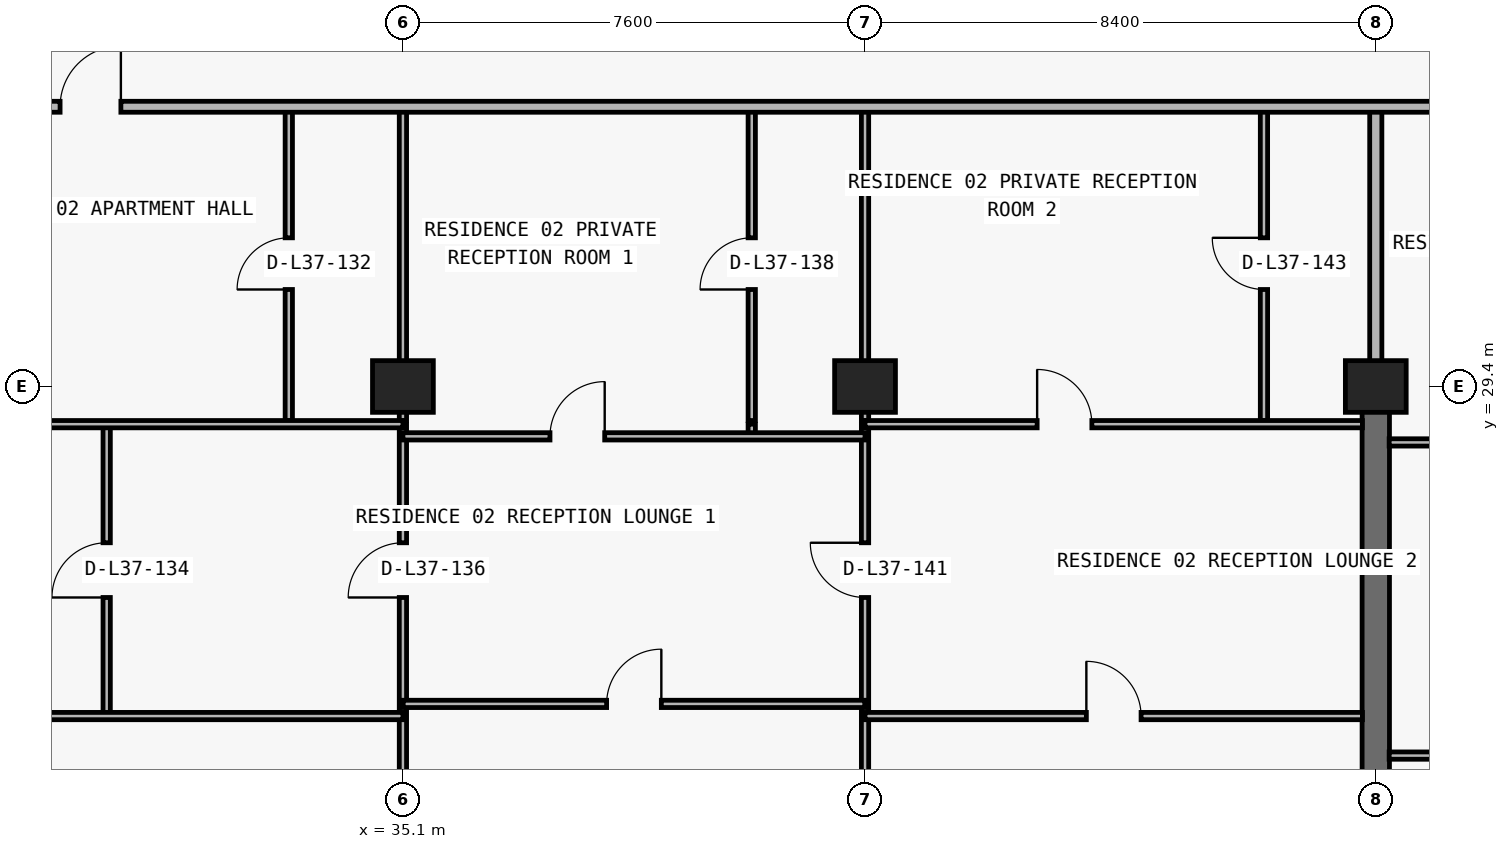
"""IFC4 building model, lengths in metres.
Left out: names, types, materials, properties, quantities, classifications, styles, units other than length and angle.
Written with IfcOpenShell. Run it as: python <this file> out.ifc"""

import sys

from ifc_helpers import new_model, si_unit, direction, frame, frame_2d, origin, origin_2d, place, context, subcontext, project, spatial, rectangle, extrude, element, fill, save


model = new_model("IFC4")
c1 = context("Model", 3, precision=1e-05, world=origin(), true_north=direction((0.0, 1.0)))
c2 = subcontext(c1, "Body", "Model", "MODEL_VIEW")
j1 = project(units=[si_unit("LENGTHUNIT", "METRE"), si_unit("PLANEANGLEUNIT", "RADIAN")], contexts=[c1])
p1 = place(None, origin())
s1 = spatial("IfcSite", under=j1, at=p1, CompositionType="ELEMENT")
p2 = place(p1, origin())
s2 = spatial("IfcBuilding", under=s1, at=p2, CompositionType="ELEMENT")
p3 = place(p2, frame((0.0, 0.0, 135.6)))
s3 = spatial("IfcBuildingStorey", under=s2, at=p3, CompositionType="ELEMENT", Elevation=135.6)
for number, where, z_axis, x_axis in (
    (1, (35.1, 29.4, 0.0), (0.0, 0.0, 1.0), (1.0, 0.0, 0.0)),
    (2, (42.7, 29.4, 0.0), (0.0, 0.0, 1.0), (1.0, 0.0, 0.0)),
    (3, (51.1, 29.4, 0.0), (0.0, 0.0, 1.0), (1.0, 0.0, 0.0)),
):
    element("IfcColumn", number, at=place(p3, frame(where, z_axis=z_axis, x_axis=x_axis)), inside=s3, PredefinedType="COLUMN", context=c2, shape_type="SweptSolid", body=[
        extrude(rectangle(XDim=1.0, YDim=0.85, at=origin_2d()), origin(), (0.0, 0.0, 1.0), 3.05),
    ])
p4 = place(p3, frame((51.1, 20.8, 0.0), z_axis=(0.0, 0.0, 1.0), x_axis=(0.0, 1.0, 0.0)))
e4 = element("IfcWall", 4, at=p4, inside=s3, PredefinedType="SHEAR", context=c2, shape_type="SweptSolid", body=[
    extrude(rectangle(XDim=8.6, YDim=0.45, at=frame_2d((4.3, 0.0))), origin(), (0.0, 0.0, 1.0), 3.05),
])
p5 = place(p3, frame((30.228, 23.98, 0.0), z_axis=(0.0, 0.0, 1.0), x_axis=(0.0, 1.0, 0.0)))
e5 = element("IfcWall", 5, at=p5, inside=s3, PredefinedType="PARTITIONING", context=c2, shape_type="SweptSolid", body=[
    extrude(rectangle(XDim=4.8, YDim=0.12, at=frame_2d((2.4, 0.0))), origin(), (0.0, 0.0, 1.0), 3.05),
])
p6 = place(p5, frame((1.95, 0.0, 0.0)))
e6 = element("IfcOpeningElement", 6, at=p6, cuts=e5, PredefinedType="OPENING", context=c2, shape_type="SweptSolid", body=[
    extrude(rectangle(XDim=0.9, YDim=2.15, at=frame_2d((0.45, 1.075))), frame((0.0, 0.07, 0.0), z_axis=(0.0, -1.0, 0.0), x_axis=(1.0, 0.0, 0.0)), (0.0, 0.0, 1.0), 0.14),
])
p7 = place(p3, frame((33.223, 28.84, 0.0), z_axis=(0.0, 0.0, 1.0), x_axis=(0.0, 1.0, 0.0)))
e7 = element("IfcWall", 7, at=p7, inside=s3, PredefinedType="PARTITIONING", context=c2, shape_type="SweptSolid", body=[
    extrude(rectangle(XDim=5.16, YDim=0.12, at=frame_2d((2.58, 0.0))), origin(), (0.0, 0.0, 1.0), 2.679),
])
p8 = place(p7, frame((2.155, 0.0, 0.0)))
e8 = element("IfcOpeningElement", 8, at=p8, cuts=e7, PredefinedType="OPENING", context=c2, shape_type="SweptSolid", body=[
    extrude(rectangle(XDim=0.85, YDim=2.1, at=frame_2d((0.425, 1.05))), frame((0.0, 0.07, 0.0), z_axis=(0.0, -1.0, 0.0), x_axis=(1.0, 0.0, 0.0)), (0.0, 0.0, 1.0), 0.14),
])
p9 = place(p3, frame((35.1, 8.84, 0.0), z_axis=(0.0, 0.0, 1.0), x_axis=(0.0, 1.0, 0.0)))
e9 = element("IfcWall", 9, at=p9, inside=s3, PredefinedType="PARTITIONING", context=c2, shape_type="SweptSolid", body=[
    extrude(rectangle(XDim=19.94, YDim=0.12, at=frame_2d((9.97, 0.0))), origin(), (0.0, 0.0, 1.0), 2.174),
])
p10 = place(p9, frame((17.09, 0.0, 0.0)))
e10 = element("IfcOpeningElement", 10, at=p10, cuts=e9, PredefinedType="OPENING", context=c2, shape_type="SweptSolid", body=[
    extrude(rectangle(XDim=0.9, YDim=2.124, at=frame_2d((0.45, 1.062))), frame((0.0, 0.07, 0.0), z_axis=(0.0, -1.0, 0.0), x_axis=(1.0, 0.0, 0.0)), (0.0, 0.0, 1.0), 0.14),
])
p11 = place(p3, frame((35.1, 28.84, 0.0), z_axis=(0.0, 0.0, 1.0), x_axis=(0.0, 1.0, 0.0)))
e11 = element("IfcWall", 11, at=p11, inside=s3, PredefinedType="PARTITIONING", context=c2, shape_type="SweptSolid", body=[
    extrude(rectangle(XDim=5.16, YDim=0.12, at=frame_2d((2.58, 0.0))), origin(), (0.0, 0.0, 1.0), 2.174),
])
p12 = place(p3, frame((40.837, 28.58, 0.0), z_axis=(0.0, 0.0, 1.0), x_axis=(0.0, 1.0, 0.0)))
e12 = element("IfcWall", 12, at=p12, inside=s3, PredefinedType="PARTITIONING", context=c2, shape_type="SweptSolid", body=[
    extrude(rectangle(XDim=0.2, YDim=0.12, at=frame_2d((0.1, 0.0))), origin(), (0.0, 0.0, 1.0), 2.679),
])
p13 = place(p3, frame((40.837, 28.84, 0.0), z_axis=(0.0, 0.0, 1.0), x_axis=(0.0, 1.0, 0.0)))
e13 = element("IfcWall", 13, at=p13, inside=s3, PredefinedType="PARTITIONING", context=c2, shape_type="SweptSolid", body=[
    extrude(rectangle(XDim=5.16, YDim=0.12, at=frame_2d((2.58, 0.0))), origin(), (0.0, 0.0, 1.0), 2.679),
])
p14 = place(p13, frame((2.155, 0.0, 0.0)))
e14 = element("IfcOpeningElement", 14, at=p14, cuts=e13, PredefinedType="OPENING", context=c2, shape_type="SweptSolid", body=[
    extrude(rectangle(XDim=0.85, YDim=2.1, at=frame_2d((0.425, 1.05))), frame((0.0, 0.07, 0.0), z_axis=(0.0, -1.0, 0.0), x_axis=(1.0, 0.0, 0.0)), (0.0, 0.0, 1.0), 0.14),
])
p15 = place(p3, frame((42.7, 8.84, 0.0), z_axis=(0.0, 0.0, 1.0), x_axis=(0.0, 1.0, 0.0)))
e15 = element("IfcWall", 15, at=p15, inside=s3, PredefinedType="PARTITIONING", context=c2, shape_type="SweptSolid", body=[
    extrude(rectangle(XDim=19.94, YDim=0.12, at=frame_2d((9.97, 0.0))), origin(), (0.0, 0.0, 1.0), 2.174),
])
p16 = place(p15, frame((17.09, 0.0, 0.0)))
e16 = element("IfcOpeningElement", 16, at=p16, cuts=e15, PredefinedType="OPENING", context=c2, shape_type="SweptSolid", body=[
    extrude(rectangle(XDim=0.9, YDim=2.124, at=frame_2d((0.45, 1.062))), frame((0.0, 0.07, 0.0), z_axis=(0.0, -1.0, 0.0), x_axis=(1.0, 0.0, 0.0)), (0.0, 0.0, 1.0), 0.14),
])
p17 = place(p3, frame((42.7, 28.84, 0.0), z_axis=(0.0, 0.0, 1.0), x_axis=(0.0, 1.0, 0.0)))
e17 = element("IfcWall", 17, at=p17, inside=s3, PredefinedType="PARTITIONING", context=c2, shape_type="SweptSolid", body=[
    extrude(rectangle(XDim=5.16, YDim=0.12, at=frame_2d((2.58, 0.0))), origin(), (0.0, 0.0, 1.0), 2.174),
])
p18 = place(p3, frame((49.261, 28.84, 0.0), z_axis=(0.0, 0.0, 1.0), x_axis=(0.0, 1.0, 0.0)))
e18 = element("IfcWall", 18, at=p18, inside=s3, PredefinedType="PARTITIONING", context=c2, shape_type="SweptSolid", body=[
    extrude(rectangle(XDim=5.16, YDim=0.12, at=frame_2d((2.58, 0.0))), origin(), (0.0, 0.0, 1.0), 2.679),
])
p19 = place(p18, frame((2.155, 0.0, 0.0)))
e19 = element("IfcOpeningElement", 19, at=p19, cuts=e18, PredefinedType="OPENING", context=c2, shape_type="SweptSolid", body=[
    extrude(rectangle(XDim=0.85, YDim=2.1, at=frame_2d((0.425, 1.05))), frame((0.0, 0.07, 0.0), z_axis=(0.0, -1.0, 0.0), x_axis=(1.0, 0.0, 0.0)), (0.0, 0.0, 1.0), 0.14),
])
p20 = place(p3, frame((51.1, 29.405, 0.0), z_axis=(0.0, 0.0, 1.0), x_axis=(0.0, 1.0, 0.0)))
e20 = element("IfcWall", 20, at=p20, inside=s3, PredefinedType="PARTITIONING", context=c2, shape_type="SweptSolid", body=[
    extrude(rectangle(XDim=4.595, YDim=0.2, at=frame_2d((2.297, 0.0))), origin(), (0.0, 0.0, 1.0), 2.335),
])
p21 = place(p3, frame((51.32, 23.33, 0.0), z_axis=(0.0, 0.0, 1.0), x_axis=(1.0, 0.0, 0.0)))
e21 = element("IfcWall", 21, at=p21, inside=s3, PredefinedType="PARTITIONING", context=c2, shape_type="SweptSolid", body=[
    extrude(rectangle(XDim=4.566, YDim=0.12, at=frame_2d((2.283, 0.0))), origin(), (0.0, 0.0, 1.0), 3.05),
])
p22 = place(p21, frame((1.414, 0.0, 0.0)))
e22 = element("IfcOpeningElement", 22, at=p22, cuts=e21, PredefinedType="OPENING", context=c2, shape_type="SweptSolid", body=[
    extrude(rectangle(XDim=0.9, YDim=2.15, at=frame_2d((0.45, 1.075))), frame((0.0, 0.07, 0.0), z_axis=(0.0, -1.0, 0.0), x_axis=(1.0, 0.0, 0.0)), (0.0, 0.0, 1.0), 0.14),
])
p23 = place(p3, frame((26.92, 23.98, 0.0), z_axis=(0.0, 0.0, 1.0), x_axis=(1.0, 0.0, 0.0)))
e23 = element("IfcWall", 23, at=p23, inside=s3, PredefinedType="PARTITIONING", context=c2, shape_type="SweptSolid", body=[
    extrude(rectangle(XDim=8.18, YDim=0.12, at=frame_2d((4.09, 0.0))), origin(), (0.0, 0.0, 1.0), 3.05),
])
p24 = place(p23, frame((1.204, 0.0, 0.0)))
e24 = element("IfcOpeningElement", 24, at=p24, cuts=e23, PredefinedType="OPENING", context=c2, shape_type="SweptSolid", body=[
    extrude(rectangle(XDim=0.9, YDim=2.15, at=frame_2d((0.45, 1.075))), frame((0.0, 0.07, 0.0), z_axis=(0.0, -1.0, 0.0), x_axis=(1.0, 0.0, 0.0)), (0.0, 0.0, 1.0), 0.14),
])
p25 = place(p3, frame((42.7, 23.98, 0.0), z_axis=(0.0, 0.0, 1.0), x_axis=(1.0, 0.0, 0.0)))
e25 = element("IfcWall", 25, at=p25, inside=s3, PredefinedType="PARTITIONING", context=c2, shape_type="SweptSolid", body=[
    extrude(rectangle(XDim=8.18, YDim=0.12, at=frame_2d((4.09, 0.0))), origin(), (0.0, 0.0, 1.0), 3.05),
])
p26 = place(p25, frame((3.64, 0.0, 0.0)))
e26 = element("IfcOpeningElement", 26, at=p26, cuts=e25, PredefinedType="OPENING", context=c2, shape_type="SweptSolid", body=[
    extrude(rectangle(XDim=0.9, YDim=2.15, at=frame_2d((0.45, 1.075))), frame((0.0, 0.07, 0.0), z_axis=(0.0, -1.0, 0.0), x_axis=(1.0, 0.0, 0.0)), (0.0, 0.0, 1.0), 0.14),
])
p27 = place(p3, frame((35.105, 24.18, 0.0), z_axis=(0.0, 0.0, 1.0), x_axis=(1.0, 0.0, 0.0)))
e27 = element("IfcWall", 27, at=p27, inside=s3, PredefinedType="PARTITIONING", context=c2, shape_type="SweptSolid", body=[
    extrude(rectangle(XDim=7.59, YDim=0.12, at=frame_2d((3.795, 0.0))), origin(), (0.0, 0.0, 1.0), 3.05),
])
p28 = place(p27, frame((3.345, 0.0, 0.0)))
e28 = element("IfcOpeningElement", 28, at=p28, cuts=e27, PredefinedType="OPENING", context=c2, shape_type="SweptSolid", body=[
    extrude(rectangle(XDim=0.9, YDim=2.15, at=frame_2d((0.45, 1.075))), frame((0.0, 0.07, 0.0), z_axis=(0.0, -1.0, 0.0), x_axis=(1.0, 0.0, 0.0)), (0.0, 0.0, 1.0), 0.14),
])
p29 = place(p3, frame((51.32, 28.48, 0.0), z_axis=(0.0, 0.0, 1.0), x_axis=(1.0, 0.0, 0.0)))
e29 = element("IfcWall", 29, at=p29, inside=s3, PredefinedType="PARTITIONING", context=c2, shape_type="SweptSolid", body=[
    extrude(rectangle(XDim=4.566, YDim=0.12, at=frame_2d((2.283, 0.0))), origin(), (0.0, 0.0, 1.0), 3.05),
])
p30 = place(p29, frame((1.833, 0.0, 0.0)))
e30 = element("IfcOpeningElement", 30, at=p30, cuts=e29, PredefinedType="OPENING", context=c2, shape_type="SweptSolid", body=[
    extrude(rectangle(XDim=0.9, YDim=2.15, at=frame_2d((0.45, 1.075))), frame((0.0, 0.07, 0.0), z_axis=(0.0, -1.0, 0.0), x_axis=(1.0, 0.0, 0.0)), (0.0, 0.0, 1.0), 0.14),
])
p31 = place(p3, frame((35.1, 28.58, 0.0), z_axis=(0.0, 0.0, 1.0), x_axis=(1.0, 0.0, 0.0)))
e31 = element("IfcWall", 31, at=p31, inside=s3, PredefinedType="PARTITIONING", context=c2, shape_type="SweptSolid", body=[
    extrude(rectangle(XDim=7.6, YDim=0.12, at=frame_2d((3.8, 0.0))), origin(), (0.0, 0.0, 1.0), 3.05),
])
p32 = place(p31, frame((2.418, 0.0, 0.0)))
e32 = element("IfcOpeningElement", 32, at=p32, cuts=e31, PredefinedType="OPENING", context=c2, shape_type="SweptSolid", body=[
    extrude(rectangle(XDim=0.9, YDim=2.15, at=frame_2d((0.45, 1.075))), frame((0.0, 0.07, 0.0), z_axis=(0.0, -1.0, 0.0), x_axis=(1.0, 0.0, 0.0)), (0.0, 0.0, 1.0), 0.14),
])
p33 = place(p3, frame((26.92, 28.78, 0.0), z_axis=(0.0, 0.0, 1.0), x_axis=(1.0, 0.0, 0.0)))
e33 = element("IfcWall", 33, at=p33, inside=s3, PredefinedType="PARTITIONING", context=c2, shape_type="SweptSolid", body=[
    extrude(rectangle(XDim=8.18, YDim=0.12, at=frame_2d((4.09, 0.0))), origin(), (0.0, 0.0, 1.0), 3.05),
])
p34 = place(p33, frame((1.204, 0.0, 0.0)))
e34 = element("IfcOpeningElement", 34, at=p34, cuts=e33, PredefinedType="OPENING", context=c2, shape_type="SweptSolid", body=[
    extrude(rectangle(XDim=0.9, YDim=2.15, at=frame_2d((0.45, 1.075))), frame((0.0, 0.07, 0.0), z_axis=(0.0, -1.0, 0.0), x_axis=(1.0, 0.0, 0.0)), (0.0, 0.0, 1.0), 0.14),
])
p35 = place(p3, frame((42.7, 28.78, 0.0), z_axis=(0.0, 0.0, 1.0), x_axis=(1.0, 0.0, 0.0)))
e35 = element("IfcWall", 35, at=p35, inside=s3, PredefinedType="PARTITIONING", context=c2, shape_type="SweptSolid", body=[
    extrude(rectangle(XDim=8.18, YDim=0.12, at=frame_2d((4.09, 0.0))), origin(), (0.0, 0.0, 1.0), 3.05),
])
p36 = place(p35, frame((2.831, 0.0, 0.0)))
e36 = element("IfcOpeningElement", 36, at=p36, cuts=e35, PredefinedType="OPENING", context=c2, shape_type="SweptSolid", body=[
    extrude(rectangle(XDim=0.9, YDim=2.15, at=frame_2d((0.45, 1.075))), frame((0.0, 0.07, 0.0), z_axis=(0.0, -1.0, 0.0), x_axis=(1.0, 0.0, 0.0)), (0.0, 0.0, 1.0), 0.14),
])
p37 = place(p3, frame((18.3, 34.0, 0.0), z_axis=(0.0, 0.0, 1.0), x_axis=(1.0, 0.0, 0.0)))
e37 = element("IfcWall", 37, at=p37, inside=s3, PredefinedType="PARTITIONING", context=c2, shape_type="SweptSolid", body=[
    extrude(rectangle(XDim=37.586, YDim=0.18, at=frame_2d((18.793, 0.0))), origin(), (0.0, 0.0, 1.0), 3.05),
])
p38 = place(p37, frame((11.162, 0.0, 0.0)))
e38 = element("IfcOpeningElement", 38, at=p38, cuts=e37, PredefinedType="OPENING", context=c2, shape_type="SweptSolid", body=[
    extrude(rectangle(XDim=1.0, YDim=2.2, at=frame_2d((0.5, 1.1))), frame((0.0, 0.1, 0.0), z_axis=(0.0, -1.0, 0.0), x_axis=(1.0, 0.0, 0.0)), (0.0, 0.0, 1.0), 0.2),
])
p39 = place(p37, frame((34.693, 0.0, 0.0)))
e39 = element("IfcOpeningElement", 39, at=p39, cuts=e37, PredefinedType="OPENING", context=c2, shape_type="SweptSolid", body=[
    extrude(rectangle(XDim=1.0, YDim=2.2, at=frame_2d((0.5, 1.1))), frame((0.0, 0.1, 0.0), z_axis=(0.0, -1.0, 0.0), x_axis=(1.0, 0.0, 0.0)), (0.0, 0.0, 1.0), 0.2),
])
p40 = place(p38, origin())
e40 = element("IfcDoor", 40, at=p40, inside=s3, OperationType="SINGLE_SWING_RIGHT", PredefinedType="DOOR", context=c2, shape_type="SweptSolid", body=[
    extrude(rectangle(XDim=1.0, YDim=2.2, at=frame_2d((0.5, 1.1))), frame((0.0, 0.025, 0.0), z_axis=(0.0, -1.0, 0.0), x_axis=(1.0, 0.0, 0.0)), (0.0, 0.0, 1.0), 0.05),
])
fill(e38, e40)
p41 = place(p8, origin())
e41 = element("IfcDoor", 41, at=p41, inside=s3, OperationType="SINGLE_SWING_LEFT", PredefinedType="DOOR", context=c2, shape_type="SweptSolid", body=[
    extrude(rectangle(XDim=0.85, YDim=2.1, at=frame_2d((0.425, 1.05))), frame((0.0, 0.025, 0.0), z_axis=(0.0, -1.0, 0.0), x_axis=(1.0, 0.0, 0.0)), (0.0, 0.0, 1.0), 0.05),
])
fill(e8, e41)
p42 = place(p6, origin())
e42 = element("IfcDoor", 42, at=p42, inside=s3, OperationType="SINGLE_SWING_LEFT", PredefinedType="DOOR", context=c2, shape_type="SweptSolid", body=[
    extrude(rectangle(XDim=0.9, YDim=2.15, at=frame_2d((0.45, 1.075))), frame((0.0, 0.025, 0.0), z_axis=(0.0, -1.0, 0.0), x_axis=(1.0, 0.0, 0.0)), (0.0, 0.0, 1.0), 0.05),
])
fill(e6, e42)
p43 = place(p10, origin())
e43 = element("IfcDoor", 43, at=p43, inside=s3, OperationType="SINGLE_SWING_LEFT", PredefinedType="DOOR", context=c2, shape_type="SweptSolid", body=[
    extrude(rectangle(XDim=0.9, YDim=2.124, at=frame_2d((0.45, 1.062))), frame((0.0, 0.025, 0.0), z_axis=(0.0, -1.0, 0.0), x_axis=(1.0, 0.0, 0.0)), (0.0, 0.0, 1.0), 0.05),
])
fill(e10, e43)
p44 = place(p32, origin())
e44 = element("IfcDoor", 44, at=p44, inside=s3, OperationType="SINGLE_SWING_RIGHT", PredefinedType="DOOR", context=c2, shape_type="SweptSolid", body=[
    extrude(rectangle(XDim=0.9, YDim=2.15, at=frame_2d((0.45, 1.075))), frame((0.0, 0.025, 0.0), z_axis=(0.0, -1.0, 0.0), x_axis=(1.0, 0.0, 0.0)), (0.0, 0.0, 1.0), 0.05),
])
fill(e32, e44)
p45 = place(p14, origin())
e45 = element("IfcDoor", 45, at=p45, inside=s3, OperationType="SINGLE_SWING_LEFT", PredefinedType="DOOR", context=c2, shape_type="SweptSolid", body=[
    extrude(rectangle(XDim=0.85, YDim=2.1, at=frame_2d((0.425, 1.05))), frame((0.0, 0.025, 0.0), z_axis=(0.0, -1.0, 0.0), x_axis=(1.0, 0.0, 0.0)), (0.0, 0.0, 1.0), 0.05),
])
fill(e14, e45)
p46 = place(p28, origin())
e46 = element("IfcDoor", 46, at=p46, inside=s3, OperationType="SINGLE_SWING_RIGHT", PredefinedType="DOOR", context=c2, shape_type="SweptSolid", body=[
    extrude(rectangle(XDim=0.9, YDim=2.15, at=frame_2d((0.45, 1.075))), frame((0.0, 0.025, 0.0), z_axis=(0.0, -1.0, 0.0), x_axis=(1.0, 0.0, 0.0)), (0.0, 0.0, 1.0), 0.05),
])
fill(e28, e46)
p47 = place(p16, origin())
e47 = element("IfcDoor", 47, at=p47, inside=s3, OperationType="SINGLE_SWING_RIGHT", PredefinedType="DOOR", context=c2, shape_type="SweptSolid", body=[
    extrude(rectangle(XDim=0.9, YDim=2.124, at=frame_2d((0.45, 1.062))), frame((0.0, 0.025, 0.0), z_axis=(0.0, -1.0, 0.0), x_axis=(1.0, 0.0, 0.0)), (0.0, 0.0, 1.0), 0.05),
])
fill(e16, e47)
p48 = place(p36, origin())
e48 = element("IfcDoor", 48, at=p48, inside=s3, OperationType="SINGLE_SWING_LEFT", PredefinedType="DOOR", context=c2, shape_type="SweptSolid", body=[
    extrude(rectangle(XDim=0.9, YDim=2.15, at=frame_2d((0.45, 1.075))), frame((0.0, 0.025, 0.0), z_axis=(0.0, -1.0, 0.0), x_axis=(1.0, 0.0, 0.0)), (0.0, 0.0, 1.0), 0.05),
])
fill(e36, e48)
p49 = place(p19, origin())
e49 = element("IfcDoor", 49, at=p49, inside=s3, OperationType="SINGLE_SWING_RIGHT", PredefinedType="DOOR", context=c2, shape_type="SweptSolid", body=[
    extrude(rectangle(XDim=0.85, YDim=2.1, at=frame_2d((0.425, 1.05))), frame((0.0, 0.025, 0.0), z_axis=(0.0, -1.0, 0.0), x_axis=(1.0, 0.0, 0.0)), (0.0, 0.0, 1.0), 0.05),
])
fill(e19, e49)
p50 = place(p26, origin())
e50 = element("IfcDoor", 50, at=p50, inside=s3, OperationType="SINGLE_SWING_LEFT", PredefinedType="DOOR", context=c2, shape_type="SweptSolid", body=[
    extrude(rectangle(XDim=0.9, YDim=2.15, at=frame_2d((0.45, 1.075))), frame((0.0, 0.025, 0.0), z_axis=(0.0, -1.0, 0.0), x_axis=(1.0, 0.0, 0.0)), (0.0, 0.0, 1.0), 0.05),
])
fill(e26, e50)
save(model, sys.argv[1])
